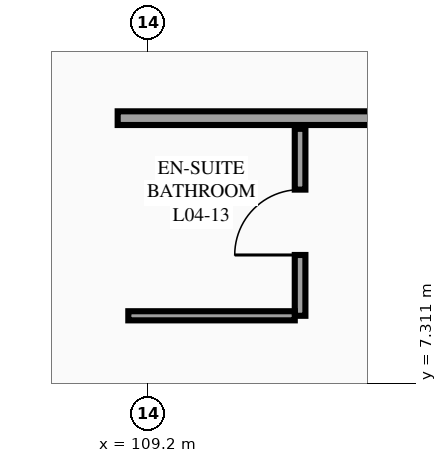
"""IFC4 building model, lengths in metres.
Left out: names, types, materials, properties, quantities, classifications, styles, units other than length and angle.
Written with IfcOpenShell. Run it as: python <this file> out.ifc"""

import sys

from ifc_helpers import new_model, si_unit, direction, frame, frame_2d, origin, place, context, subcontext, project, spatial, rectangle, extrude, element, fill, save


model = new_model("IFC4")
c1 = context("Model", 3, precision=1e-05, world=origin(), true_north=direction((0.0, 1.0)))
c2 = subcontext(c1, "Body", "Model", "MODEL_VIEW")
j1 = project(units=[si_unit("LENGTHUNIT", "METRE"), si_unit("PLANEANGLEUNIT", "RADIAN")], contexts=[c1])
p1 = place(None, origin())
s1 = spatial("IfcSite", under=j1, at=p1, CompositionType="ELEMENT")
p2 = place(p1, origin())
s2 = spatial("IfcBuilding", under=s1, at=p2, CompositionType="ELEMENT")
p3 = place(p2, frame((0.0, 0.0, 18.3)))
s3 = spatial("IfcBuildingStorey", under=s2, at=p3, CompositionType="ELEMENT", Elevation=18.3)
p4 = place(p3, frame((108.8, 10.8, 0.0), z_axis=(0.0, 0.0, 1.0), x_axis=(1.0, 0.0, 0.0)))
e1 = element("IfcWall", 1, at=p4, inside=s3, PredefinedType="PARTITIONING", context=c2, shape_type="SweptSolid", body=[
    extrude(rectangle(XDim=6.88, YDim=0.18, at=frame_2d((3.44, 0.0))), origin(), (0.0, 0.0, 1.0), 3.375),
])
p5 = place(p4, frame((4.653, 0.0, 0.0)))
e2 = element("IfcOpeningElement", 2, at=p5, cuts=e1, PredefinedType="OPENING", context=c2, shape_type="SweptSolid", body=[
    extrude(rectangle(XDim=0.96, YDim=2.15, at=frame_2d((0.48, 1.075))), frame((0.0, 0.1, 0.0), z_axis=(0.0, -1.0, 0.0), x_axis=(1.0, 0.0, 0.0)), (0.0, 0.0, 1.0), 0.2),
])
p6 = place(p3, frame((111.2, 8.2, 0.0), z_axis=(0.0, 0.0, 1.0), x_axis=(0.0, 1.0, 0.0)))
e3 = element("IfcWall", 3, at=p6, inside=s3, PredefinedType="PARTITIONING", context=c2, shape_type="SweptSolid", body=[
    extrude(rectangle(XDim=2.46, YDim=0.14, at=frame_2d((1.23, 0.0))), origin(), (0.0, 0.0, 1.0), 3.375),
])
p7 = place(p6, frame((0.8, 0.0, 0.0)))
e4 = element("IfcOpeningElement", 4, at=p7, cuts=e3, PredefinedType="OPENING", context=c2, shape_type="SweptSolid", body=[
    extrude(rectangle(XDim=0.86, YDim=2.1, at=frame_2d((0.43, 1.05))), frame((0.0, 0.08, 0.0), z_axis=(0.0, -1.0, 0.0), x_axis=(1.0, 0.0, 0.0)), (0.0, 0.0, 1.0), 0.16),
])
p8 = place(p3, frame((108.94, 8.2, 0.0), z_axis=(0.0, 0.0, 1.0), x_axis=(1.0, 0.0, 0.0)))
e5 = element("IfcWall", 5, at=p8, inside=s3, PredefinedType="PARTITIONING", context=c2, shape_type="SweptSolid", body=[
    extrude(rectangle(XDim=2.19, YDim=0.12, at=frame_2d((1.095, 0.0))), origin(), (0.0, 0.0, 1.0), 3.375),
])
p9 = place(p7, origin())
e6 = element("IfcDoor", 6, at=p9, inside=s3, OperationType="SINGLE_SWING_LEFT", PredefinedType="DOOR", context=c2, shape_type="SweptSolid", body=[
    extrude(rectangle(XDim=0.86, YDim=2.1, at=frame_2d((0.43, 1.05))), frame((0.0, 0.025, 0.0), z_axis=(0.0, -1.0, 0.0), x_axis=(1.0, 0.0, 0.0)), (0.0, 0.0, 1.0), 0.05),
])
fill(e4, e6)
save(model, sys.argv[1])
